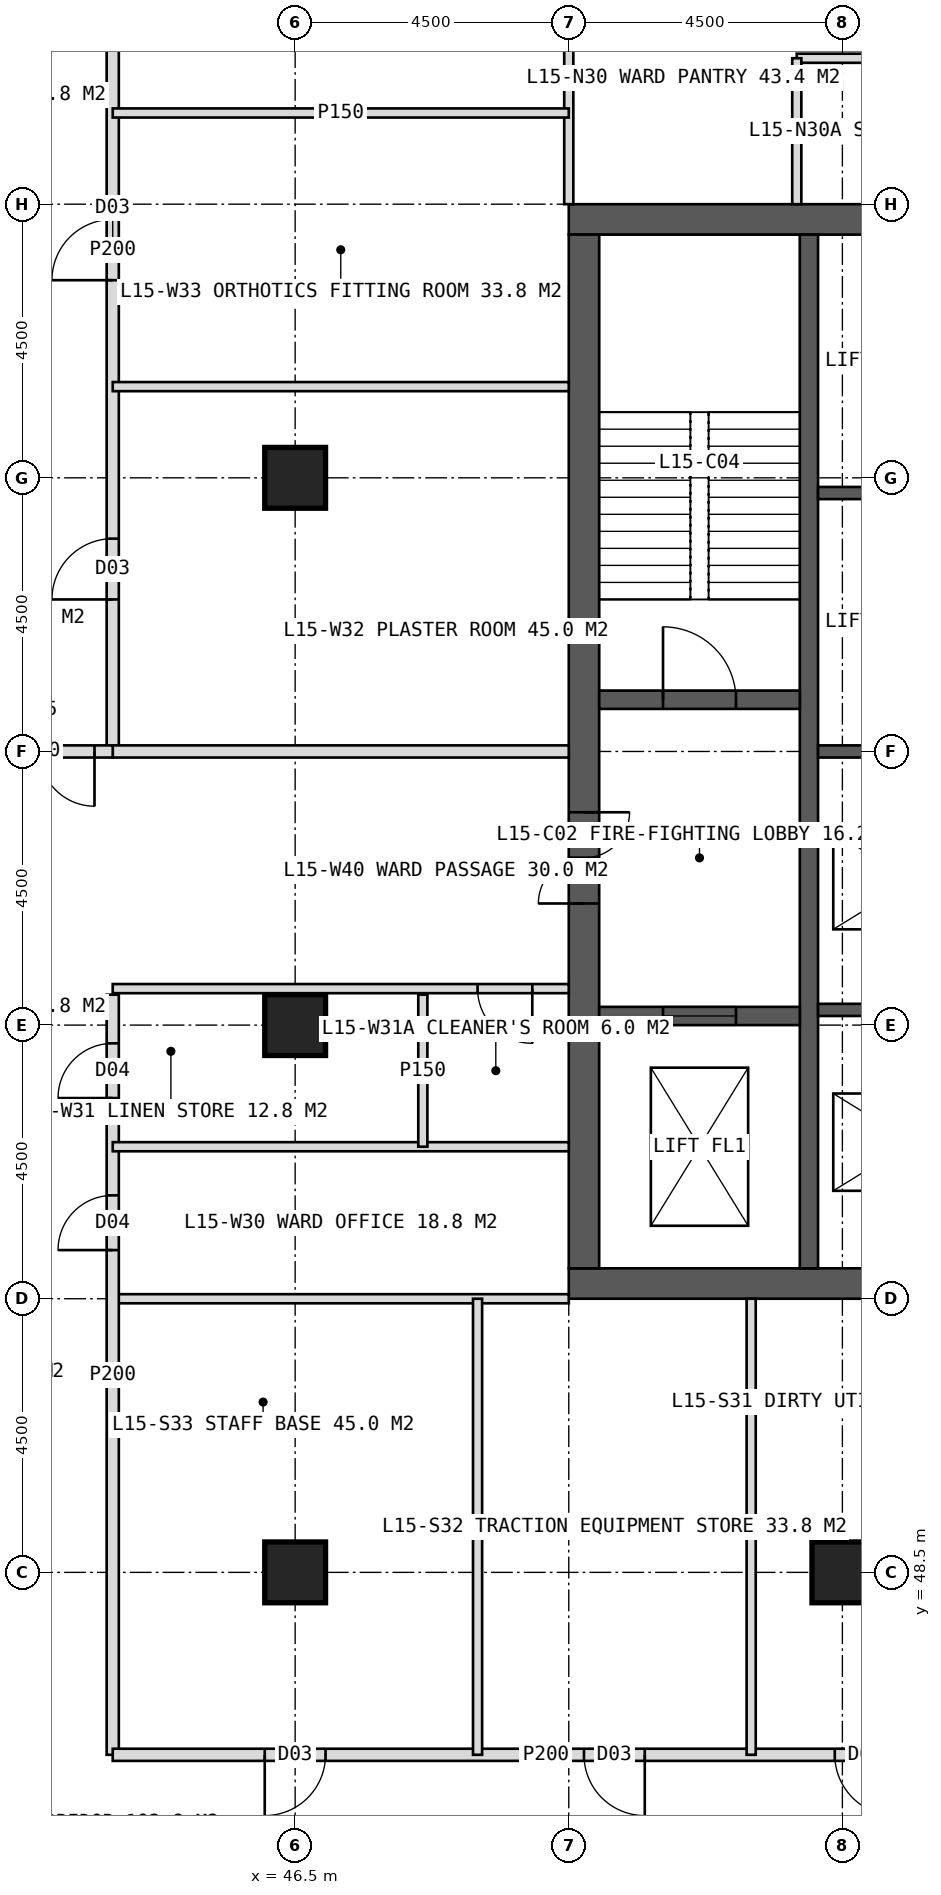
"""IFC4 building model, lengths in metres.
Left out: names, types, materials, properties, quantities, classifications, styles, units other than length and angle.
Written with IfcOpenShell. Run it as: python <this file> out.ifc"""

import sys

from ifc_helpers import new_model, si_unit, direction, frame, frame_2d, origin, origin_2d, place, context, subcontext, project, spatial, rectangle, hollow_rectangle, extrude, element, fill, save


model = new_model("IFC4")
c1 = context("Model", 3, precision=1e-05, world=origin(), true_north=direction((0.0, 1.0)))
c2 = subcontext(c1, "Body", "Model", "MODEL_VIEW")
j1 = project(units=[si_unit("LENGTHUNIT", "METRE"), si_unit("PLANEANGLEUNIT", "RADIAN")], contexts=[c1])
p1 = place(None, origin())
s1 = spatial("IfcSite", under=j1, at=p1, CompositionType="ELEMENT")
p2 = place(p1, origin())
s2 = spatial("IfcBuilding", under=s1, at=p2, CompositionType="ELEMENT")
p3 = place(p2, frame((0.0, 0.0, 67.0)))
s3 = spatial("IfcBuildingStorey", under=s2, at=p3, CompositionType="ELEMENT", Elevation=67.0)
p4 = place(p3, frame((51.0, 70.75, 0.0), z_axis=(0.0, 0.0, 1.0), x_axis=(1.0, 0.0, 0.0)))
e1 = element("IfcWall", 1, at=p4, inside=s3, PredefinedType="SHEAR", context=c2, shape_type="SweptSolid", body=[
    extrude(rectangle(XDim=18.0, YDim=0.5, at=frame_2d((9.0, 0.0))), origin(), (0.0, 0.0, 1.0), 4.0),
])
p5 = place(p4, frame((8.1, 0.0, 0.0)))
e2 = element("IfcOpeningElement", 2, at=p5, cuts=e1, PredefinedType="OPENING", context=c2, shape_type="SweptSolid", body=[
    extrude(rectangle(XDim=1.8, YDim=2.2, at=frame_2d((0.9, 1.1))), frame((0.0, 0.26, 0.0), z_axis=(0.0, -1.0, 0.0), x_axis=(1.0, 0.0, 0.0)), (0.0, 0.0, 1.0), 0.52),
])
p6 = place(p3, frame((51.0, 53.25, 0.0), z_axis=(0.0, 0.0, 1.0), x_axis=(1.0, 0.0, 0.0)))
e3 = element("IfcWall", 3, at=p6, inside=s3, PredefinedType="SHEAR", context=c2, shape_type="SweptSolid", body=[
    extrude(rectangle(XDim=18.0, YDim=0.5, at=frame_2d((9.0, 0.0))), origin(), (0.0, 0.0, 1.0), 4.0),
])
p7 = place(p6, frame((8.1, 0.0, 0.0)))
e4 = element("IfcOpeningElement", 4, at=p7, cuts=e3, PredefinedType="OPENING", context=c2, shape_type="SweptSolid", body=[
    extrude(rectangle(XDim=1.8, YDim=2.2, at=frame_2d((0.9, 1.1))), frame((0.0, 0.26, 0.0), z_axis=(0.0, -1.0, 0.0), x_axis=(1.0, 0.0, 0.0)), (0.0, 0.0, 1.0), 0.52),
])
p8 = place(p3, frame((51.25, 53.5, 0.0), z_axis=(0.0, 0.0, 1.0), x_axis=(0.0, 1.0, 0.0)))
e5 = element("IfcWall", 5, at=p8, inside=s3, PredefinedType="SHEAR", context=c2, shape_type="SweptSolid", body=[
    extrude(rectangle(XDim=17.0, YDim=0.5, at=frame_2d((8.5, 0.0))), origin(), (0.0, 0.0, 1.0), 4.0),
])
p9 = place(p8, frame((6.0, 0.0, 0.0)))
e6 = element("IfcOpeningElement", 6, at=p9, cuts=e5, PredefinedType="OPENING", context=c2, shape_type="SweptSolid", body=[
    extrude(rectangle(XDim=1.5, YDim=2.2, at=frame_2d((0.75, 1.1))), frame((0.0, 0.26, 0.0), z_axis=(0.0, -1.0, 0.0), x_axis=(1.0, 0.0, 0.0)), (0.0, 0.0, 1.0), 0.52),
])
p10 = place(p3, frame((54.95, 53.5, 0.0), z_axis=(0.0, 0.0, 1.0), x_axis=(0.0, 1.0, 0.0)))
e7 = element("IfcWall", 7, at=p10, inside=s3, PredefinedType="SHEAR", context=c2, shape_type="SweptSolid", body=[
    extrude(rectangle(XDim=17.0, YDim=0.3, at=frame_2d((8.5, 0.0))), origin(), (0.0, 0.0, 1.0), 4.0),
])
for number, where, z_axis, x_axis in (
    (8, (55.1, 57.75, 0.0), (0.0, 0.0, 1.0), (1.0, 0.0, 0.0)),
    (9, (55.1, 62.0, 0.0), (0.0, 0.0, 1.0), (1.0, 0.0, 0.0)),
    (10, (55.1, 66.25, 0.0), (0.0, 0.0, 1.0), (1.0, 0.0, 0.0)),
):
    element("IfcWall", number, at=place(p3, frame(where, z_axis=z_axis, x_axis=x_axis)), inside=s3, PredefinedType="SHEAR", context=c2, shape_type="SweptSolid", body=[
        extrude(rectangle(XDim=3.05, YDim=0.2, at=frame_2d((1.525, 0.0))), origin(), (0.0, 0.0, 1.0), 4.0),
    ])
p11 = place(p3, frame((51.5, 62.85, 0.0), z_axis=(0.0, 0.0, 1.0), x_axis=(1.0, 0.0, 0.0)))
e11 = element("IfcWall", 11, at=p11, inside=s3, PredefinedType="SHEAR", context=c2, shape_type="SweptSolid", body=[
    extrude(rectangle(XDim=3.3, YDim=0.3, at=frame_2d((1.65, 0.0))), origin(), (0.0, 0.0, 1.0), 4.0),
])
p12 = place(p11, frame((1.05, 0.0, 0.0)))
e12 = element("IfcOpeningElement", 12, at=p12, cuts=e11, PredefinedType="OPENING", context=c2, shape_type="SweptSolid", body=[
    extrude(rectangle(XDim=1.2, YDim=2.1, at=frame_2d((0.6, 1.05))), frame((0.0, 0.16, 0.0), z_axis=(0.0, -1.0, 0.0), x_axis=(1.0, 0.0, 0.0)), (0.0, 0.0, 1.0), 0.32),
])
p13 = place(p3, frame((51.5, 57.65, 0.0), z_axis=(0.0, 0.0, 1.0), x_axis=(1.0, 0.0, 0.0)))
e13 = element("IfcWall", 13, at=p13, inside=s3, PredefinedType="SHEAR", context=c2, shape_type="SweptSolid", body=[
    extrude(rectangle(XDim=3.3, YDim=0.3, at=frame_2d((1.65, 0.0))), origin(), (0.0, 0.0, 1.0), 4.0),
])
p14 = place(p13, frame((1.05, 0.0, 0.0)))
e14 = element("IfcOpeningElement", 14, at=p14, cuts=e13, PredefinedType="OPENING", context=c2, shape_type="SweptSolid", body=[
    extrude(rectangle(XDim=1.2, YDim=2.2, at=frame_2d((0.6, 1.1))), frame((0.0, 0.16, 0.0), z_axis=(0.0, -1.0, 0.0), x_axis=(1.0, 0.0, 0.0)), (0.0, 0.0, 1.0), 0.32),
])
for number, where, z_axis, x_axis in (
    (15, (46.5, 48.5, 0.0), (0.0, 0.0, 1.0), (1.0, 0.0, 0.0)),
    (16, (55.5, 48.5, 0.0), (0.0, 0.0, 1.0), (1.0, 0.0, 0.0)),
    (17, (46.5, 57.5, 0.0), (0.0, 0.0, 1.0), (1.0, 0.0, 0.0)),
    (18, (46.5, 66.5, 0.0), (0.0, 0.0, 1.0), (1.0, 0.0, 0.0)),
):
    element("IfcColumn", number, at=place(p3, frame(where, z_axis=z_axis, x_axis=x_axis)), inside=s3, PredefinedType="COLUMN", context=c2, shape_type="SweptSolid", body=[
        extrude(hollow_rectangle(XDim=1.0, YDim=1.0, WallThickness=0.1, at=origin_2d()), origin(), (0.0, 0.0, 1.0), 4.0),
    ])
p15 = place(p3, frame((51.0, 71.0, 0.0), z_axis=(0.0, 0.0, 1.0), x_axis=(0.0, 1.0, 0.0)))
e19 = element("IfcWall", 19, at=p15, inside=s3, PredefinedType="PARTITIONING", context=c2, shape_type="SweptSolid", body=[
    extrude(rectangle(XDim=7.5, YDim=0.15, at=frame_2d((3.75, 0.0))), origin(), (0.0, 0.0, 1.0), 3.75),
])
p16 = place(p3, frame((54.75, 73.4, 0.0), z_axis=(0.0, 0.0, 1.0), x_axis=(1.0, 0.0, 0.0)))
e20 = element("IfcWall", 20, at=p16, inside=s3, PredefinedType="PARTITIONING", context=c2, shape_type="SweptSolid", body=[
    extrude(rectangle(XDim=3.0, YDim=0.15, at=frame_2d((1.5, 0.0))), origin(), (0.0, 0.0, 1.0), 3.75),
])
p17 = place(p3, frame((54.75, 71.0, 0.0), z_axis=(0.0, 0.0, 1.0), x_axis=(0.0, 1.0, 0.0)))
e21 = element("IfcWall", 21, at=p17, inside=s3, PredefinedType="PARTITIONING", context=c2, shape_type="SweptSolid", body=[
    extrude(rectangle(XDim=2.4, YDim=0.15, at=frame_2d((1.2, 0.0))), origin(), (0.0, 0.0, 1.0), 3.75),
])
p18 = place(p3, frame((51.0, 53.0, 0.0), z_axis=(0.0, 0.0, 1.0), x_axis=(-1.0, 0.0, 0.0)))
e22 = element("IfcWall", 22, at=p18, inside=s3, PredefinedType="PARTITIONING", context=c2, shape_type="SweptSolid", body=[
    extrude(rectangle(XDim=7.5, YDim=0.15, at=frame_2d((3.75, 0.0))), origin(), (0.0, 0.0, 1.0), 3.75),
])
p19 = place(p3, frame((43.5, 45.5, 0.0), z_axis=(0.0, 0.0, 1.0), x_axis=(0.0, 1.0, 0.0)))
e23 = element("IfcWall", 23, at=p19, inside=s3, PredefinedType="PARTITIONING", context=c2, shape_type="SweptSolid", body=[
    extrude(rectangle(XDim=12.5, YDim=0.2, at=frame_2d((6.25, 0.0))), origin(), (0.0, 0.0, 1.0), 3.75),
])
p20 = place(p19, frame((8.3, 0.0, 0.0)))
e24 = element("IfcOpeningElement", 24, at=p20, cuts=e23, PredefinedType="OPENING", context=c2, shape_type="SweptSolid", body=[
    extrude(rectangle(XDim=0.9, YDim=2.1, at=frame_2d((0.45, 1.05))), frame((0.0, 0.11, 0.0), z_axis=(0.0, -1.0, 0.0), x_axis=(1.0, 0.0, 0.0)), (0.0, 0.0, 1.0), 0.22),
])
p21 = place(p19, frame((10.8, 0.0, 0.0)))
e25 = element("IfcOpeningElement", 25, at=p21, cuts=e23, PredefinedType="OPENING", context=c2, shape_type="SweptSolid", body=[
    extrude(rectangle(XDim=0.9, YDim=2.1, at=frame_2d((0.45, 1.05))), frame((0.0, 0.11, 0.0), z_axis=(0.0, -1.0, 0.0), x_axis=(1.0, 0.0, 0.0)), (0.0, 0.0, 1.0), 0.22),
])
p22 = place(p3, frame((43.5, 62.0, 0.0), z_axis=(0.0, 0.0, 1.0), x_axis=(0.0, 1.0, 0.0)))
e26 = element("IfcWall", 26, at=p22, inside=s3, PredefinedType="PARTITIONING", context=c2, shape_type="SweptSolid", body=[
    extrude(rectangle(XDim=16.5, YDim=0.2, at=frame_2d((8.25, 0.0))), origin(), (0.0, 0.0, 1.0), 3.75),
])
p23 = place(p22, frame((2.5, 0.0, 0.0)))
e27 = element("IfcOpeningElement", 27, at=p23, cuts=e26, PredefinedType="OPENING", context=c2, shape_type="SweptSolid", body=[
    extrude(rectangle(XDim=1.0, YDim=2.1, at=frame_2d((0.5, 1.05))), frame((0.0, 0.11, 0.0), z_axis=(0.0, -1.0, 0.0), x_axis=(1.0, 0.0, 0.0)), (0.0, 0.0, 1.0), 0.22),
])
p24 = place(p22, frame((7.75, 0.0, 0.0)))
e28 = element("IfcOpeningElement", 28, at=p24, cuts=e26, PredefinedType="OPENING", context=c2, shape_type="SweptSolid", body=[
    extrude(rectangle(XDim=1.0, YDim=2.1, at=frame_2d((0.5, 1.05))), frame((0.0, 0.11, 0.0), z_axis=(0.0, -1.0, 0.0), x_axis=(1.0, 0.0, 0.0)), (0.0, 0.0, 1.0), 0.22),
])
p25 = place(p22, frame((13.0, 0.0, 0.0)))
e29 = element("IfcOpeningElement", 29, at=p25, cuts=e26, PredefinedType="OPENING", context=c2, shape_type="SweptSolid", body=[
    extrude(rectangle(XDim=1.0, YDim=2.1, at=frame_2d((0.5, 1.05))), frame((0.0, 0.11, 0.0), z_axis=(0.0, -1.0, 0.0), x_axis=(1.0, 0.0, 0.0)), (0.0, 0.0, 1.0), 0.22),
])
p26 = place(p3, frame((51.0, 58.1, 0.0), z_axis=(0.0, 0.0, 1.0), x_axis=(-1.0, 0.0, 0.0)))
e30 = element("IfcWall", 30, at=p26, inside=s3, PredefinedType="PARTITIONING", context=c2, shape_type="SweptSolid", body=[
    extrude(rectangle(XDim=7.5, YDim=0.15, at=frame_2d((3.75, 0.0))), origin(), (0.0, 0.0, 1.0), 3.75),
])
p27 = place(p26, frame((0.6, 0.0, 0.0)))
e31 = element("IfcOpeningElement", 31, at=p27, cuts=e30, PredefinedType="OPENING", context=c2, shape_type="SweptSolid", body=[
    extrude(rectangle(XDim=0.9, YDim=2.1, at=frame_2d((0.45, 1.05))), frame((0.0, 0.085, 0.0), z_axis=(0.0, -1.0, 0.0), x_axis=(1.0, 0.0, 0.0)), (0.0, 0.0, 1.0), 0.17),
])
p28 = place(p3, frame((51.0, 62.0, 0.0), z_axis=(0.0, 0.0, 1.0), x_axis=(-1.0, 0.0, 0.0)))
e32 = element("IfcWall", 32, at=p28, inside=s3, PredefinedType="SOLIDWALL", context=c2, shape_type="SweptSolid", body=[
    extrude(rectangle(XDim=7.5, YDim=0.2, at=frame_2d((3.75, 0.0))), origin(), (0.0, 0.0, 1.0), 2.75),
])
for number, where, z_axis, x_axis in (
    (33, (51.0, 55.5, 0.0), (0.0, 0.0, 1.0), (-1.0, 0.0, 0.0)),
    (34, (51.0, 68.0, 0.0), (0.0, 0.0, 1.0), (-1.0, 0.0, 0.0)),
    (35, (51.0, 72.5, 0.0), (0.0, 0.0, 1.0), (-1.0, 0.0, 0.0)),
):
    element("IfcWall", number, at=place(p3, frame(where, z_axis=z_axis, x_axis=x_axis)), inside=s3, PredefinedType="PARTITIONING", context=c2, shape_type="SweptSolid", body=[
        extrude(rectangle(XDim=7.5, YDim=0.15, at=frame_2d((3.75, 0.0))), origin(), (0.0, 0.0, 1.0), 3.75),
    ])
p29 = place(p3, frame((48.6, 55.5, 0.0), z_axis=(0.0, 0.0, 1.0), x_axis=(0.0, 1.0, 0.0)))
e36 = element("IfcWall", 36, at=p29, inside=s3, PredefinedType="PARTITIONING", context=c2, shape_type="SweptSolid", body=[
    extrude(rectangle(XDim=2.5, YDim=0.15, at=frame_2d((1.25, 0.0))), origin(), (0.0, 0.0, 1.0), 3.75),
])
p30 = place(p3, frame((57.75, 45.5, 0.0), z_axis=(0.0, 0.0, 1.0), x_axis=(-1.0, 0.0, 0.0)))
e37 = element("IfcWall", 37, at=p30, inside=s3, PredefinedType="PARTITIONING", context=c2, shape_type="SweptSolid", body=[
    extrude(rectangle(XDim=14.25, YDim=0.2, at=frame_2d((7.125, 0.0))), origin(), (0.0, 0.0, 1.0), 3.75),
])
p31 = place(p30, frame((1.375, 0.0, 0.0)))
e38 = element("IfcOpeningElement", 38, at=p31, cuts=e37, PredefinedType="OPENING", context=c2, shape_type="SweptSolid", body=[
    extrude(rectangle(XDim=1.0, YDim=2.1, at=frame_2d((0.5, 1.05))), frame((0.0, 0.11, 0.0), z_axis=(0.0, -1.0, 0.0), x_axis=(1.0, 0.0, 0.0)), (0.0, 0.0, 1.0), 0.22),
])
p32 = place(p30, frame((5.5, 0.0, 0.0)))
e39 = element("IfcOpeningElement", 39, at=p32, cuts=e37, PredefinedType="OPENING", context=c2, shape_type="SweptSolid", body=[
    extrude(rectangle(XDim=1.0, YDim=2.1, at=frame_2d((0.5, 1.05))), frame((0.0, 0.11, 0.0), z_axis=(0.0, -1.0, 0.0), x_axis=(1.0, 0.0, 0.0)), (0.0, 0.0, 1.0), 0.22),
])
p33 = place(p30, frame((10.75, 0.0, 0.0)))
e40 = element("IfcOpeningElement", 40, at=p33, cuts=e37, PredefinedType="OPENING", context=c2, shape_type="SweptSolid", body=[
    extrude(rectangle(XDim=1.0, YDim=2.1, at=frame_2d((0.5, 1.05))), frame((0.0, 0.11, 0.0), z_axis=(0.0, -1.0, 0.0), x_axis=(1.0, 0.0, 0.0)), (0.0, 0.0, 1.0), 0.22),
])
for number, where, z_axis, x_axis in (
    (41, (54.0, 53.0, 0.0), (0.0, 0.0, 1.0), (0.0, -1.0, 0.0)),
    (42, (49.5, 53.0, 0.0), (0.0, 0.0, 1.0), (0.0, -1.0, 0.0)),
):
    element("IfcWall", number, at=place(p3, frame(where, z_axis=z_axis, x_axis=x_axis)), inside=s3, PredefinedType="PARTITIONING", context=c2, shape_type="SweptSolid", body=[
        extrude(rectangle(XDim=7.5, YDim=0.15, at=frame_2d((3.75, 0.0))), origin(), (0.0, 0.0, 1.0), 3.75),
    ])
p34 = place(p3, frame((43.5, 62.0, 0.0), z_axis=(0.0, 0.0, 1.0), x_axis=(-1.0, 0.0, 0.0)))
e43 = element("IfcWall", 43, at=p34, inside=s3, PredefinedType="SOLIDWALL", context=c2, shape_type="SweptSolid", body=[
    extrude(rectangle(XDim=2.7, YDim=0.2, at=frame_2d((1.35, 0.0))), origin(), (0.0, 0.0, 1.0), 2.75),
])
p35 = place(p34, frame((0.3, 0.0, 0.0)))
e44 = element("IfcOpeningElement", 44, at=p35, cuts=e43, PredefinedType="OPENING", context=c2, shape_type="SweptSolid", body=[
    extrude(rectangle(XDim=1.8, YDim=2.2, at=frame_2d((0.9, 1.1))), frame((0.0, 0.11, 0.0), z_axis=(0.0, -1.0, 0.0), x_axis=(1.0, 0.0, 0.0)), (0.0, 0.0, 1.0), 0.22),
])
p36 = place(p20, origin())
e45 = element("IfcDoor", 45, at=p36, inside=s3, OperationType="SINGLE_SWING_LEFT", PredefinedType="DOOR", context=c2, shape_type="SweptSolid", body=[
    extrude(rectangle(XDim=0.9, YDim=2.1, at=frame_2d((0.45, 1.05))), frame((0.0, 0.025, 0.0), z_axis=(0.0, -1.0, 0.0), x_axis=(1.0, 0.0, 0.0)), (0.0, 0.0, 1.0), 0.05),
])
fill(e24, e45)
p37 = place(p27, origin())
e46 = element("IfcDoor", 46, at=p37, inside=s3, OperationType="SINGLE_SWING_LEFT", PredefinedType="DOOR", context=c2, shape_type="SweptSolid", body=[
    extrude(rectangle(XDim=0.9, YDim=2.1, at=frame_2d((0.45, 1.05))), frame((0.0, 0.025, 0.0), z_axis=(0.0, -1.0, 0.0), x_axis=(1.0, 0.0, 0.0)), (0.0, 0.0, 1.0), 0.05),
])
fill(e31, e46)
p38 = place(p21, origin())
e47 = element("IfcDoor", 47, at=p38, inside=s3, OperationType="SINGLE_SWING_LEFT", PredefinedType="DOOR", context=c2, shape_type="SweptSolid", body=[
    extrude(rectangle(XDim=0.9, YDim=2.1, at=frame_2d((0.45, 1.05))), frame((0.0, 0.025, 0.0), z_axis=(0.0, -1.0, 0.0), x_axis=(1.0, 0.0, 0.0)), (0.0, 0.0, 1.0), 0.05),
])
fill(e25, e47)
p39 = place(p23, origin())
e48 = element("IfcDoor", 48, at=p39, inside=s3, OperationType="SINGLE_SWING_LEFT", PredefinedType="DOOR", context=c2, shape_type="SweptSolid", body=[
    extrude(rectangle(XDim=1.0, YDim=2.1, at=frame_2d((0.5, 1.05))), frame((0.0, 0.025, 0.0), z_axis=(0.0, -1.0, 0.0), x_axis=(1.0, 0.0, 0.0)), (0.0, 0.0, 1.0), 0.05),
])
fill(e27, e48)
p40 = place(p24, origin())
e49 = element("IfcDoor", 49, at=p40, inside=s3, OperationType="SINGLE_SWING_LEFT", PredefinedType="DOOR", context=c2, shape_type="SweptSolid", body=[
    extrude(rectangle(XDim=1.0, YDim=2.1, at=frame_2d((0.5, 1.05))), frame((0.0, 0.025, 0.0), z_axis=(0.0, -1.0, 0.0), x_axis=(1.0, 0.0, 0.0)), (0.0, 0.0, 1.0), 0.05),
])
fill(e28, e49)
p41 = place(p31, origin())
e50 = element("IfcDoor", 50, at=p41, inside=s3, OperationType="SINGLE_SWING_LEFT", PredefinedType="DOOR", context=c2, shape_type="SweptSolid", body=[
    extrude(rectangle(XDim=1.0, YDim=2.1, at=frame_2d((0.5, 1.05))), frame((0.0, 0.025, 0.0), z_axis=(0.0, -1.0, 0.0), x_axis=(1.0, 0.0, 0.0)), (0.0, 0.0, 1.0), 0.05),
])
fill(e38, e50)
p42 = place(p32, origin())
e51 = element("IfcDoor", 51, at=p42, inside=s3, OperationType="SINGLE_SWING_LEFT", PredefinedType="DOOR", context=c2, shape_type="SweptSolid", body=[
    extrude(rectangle(XDim=1.0, YDim=2.1, at=frame_2d((0.5, 1.05))), frame((0.0, 0.025, 0.0), z_axis=(0.0, -1.0, 0.0), x_axis=(1.0, 0.0, 0.0)), (0.0, 0.0, 1.0), 0.05),
])
fill(e39, e51)
p43 = place(p33, origin())
e52 = element("IfcDoor", 52, at=p43, inside=s3, OperationType="SINGLE_SWING_RIGHT", PredefinedType="DOOR", context=c2, shape_type="SweptSolid", body=[
    extrude(rectangle(XDim=1.0, YDim=2.1, at=frame_2d((0.5, 1.05))), frame((0.0, 0.025, 0.0), z_axis=(0.0, -1.0, 0.0), x_axis=(1.0, 0.0, 0.0)), (0.0, 0.0, 1.0), 0.05),
])
fill(e40, e52)
p44 = place(p35, origin())
e53 = element("IfcDoor", 53, at=p44, inside=s3, OperationType="DOUBLE_DOOR_DOUBLE_SWING", PredefinedType="DOOR", context=c2, shape_type="SweptSolid", body=[
    extrude(rectangle(XDim=1.8, YDim=2.2, at=frame_2d((0.9, 1.1))), frame((0.0, 0.025, 0.0), z_axis=(0.0, -1.0, 0.0), x_axis=(1.0, 0.0, 0.0)), (0.0, 0.0, 1.0), 0.05),
])
fill(e44, e53)
p45 = place(p9, origin())
e54 = element("IfcDoor", 54, at=p45, inside=s3, OperationType="DOUBLE_DOOR_SINGLE_SWING", PredefinedType="DOOR", context=c2, shape_type="SweptSolid", body=[
    extrude(rectangle(XDim=1.5, YDim=2.2, at=frame_2d((0.75, 1.1))), frame((0.0, 0.025, 0.0), z_axis=(0.0, -1.0, 0.0), x_axis=(1.0, 0.0, 0.0)), (0.0, 0.0, 1.0), 0.05),
])
fill(e6, e54)
p46 = place(p12, origin())
e55 = element("IfcDoor", 55, at=p46, inside=s3, OperationType="SINGLE_SWING_LEFT", PredefinedType="DOOR", context=c2, shape_type="SweptSolid", body=[
    extrude(rectangle(XDim=1.2, YDim=2.1, at=frame_2d((0.6, 1.05))), frame((0.0, 0.025, 0.0), z_axis=(0.0, -1.0, 0.0), x_axis=(1.0, 0.0, 0.0)), (0.0, 0.0, 1.0), 0.05),
])
fill(e12, e55)
p47 = place(p14, origin())
e56 = element("IfcDoor", 56, at=p47, inside=s3, OperationType="SLIDING_TO_LEFT", PredefinedType="DOOR", context=c2, shape_type="SweptSolid", body=[
    extrude(rectangle(XDim=1.2, YDim=2.2, at=frame_2d((0.6, 1.1))), frame((0.0, 0.025, 0.0), z_axis=(0.0, -1.0, 0.0), x_axis=(1.0, 0.0, 0.0)), (0.0, 0.0, 1.0), 0.05),
])
fill(e14, e56)
save(model, sys.argv[1])
